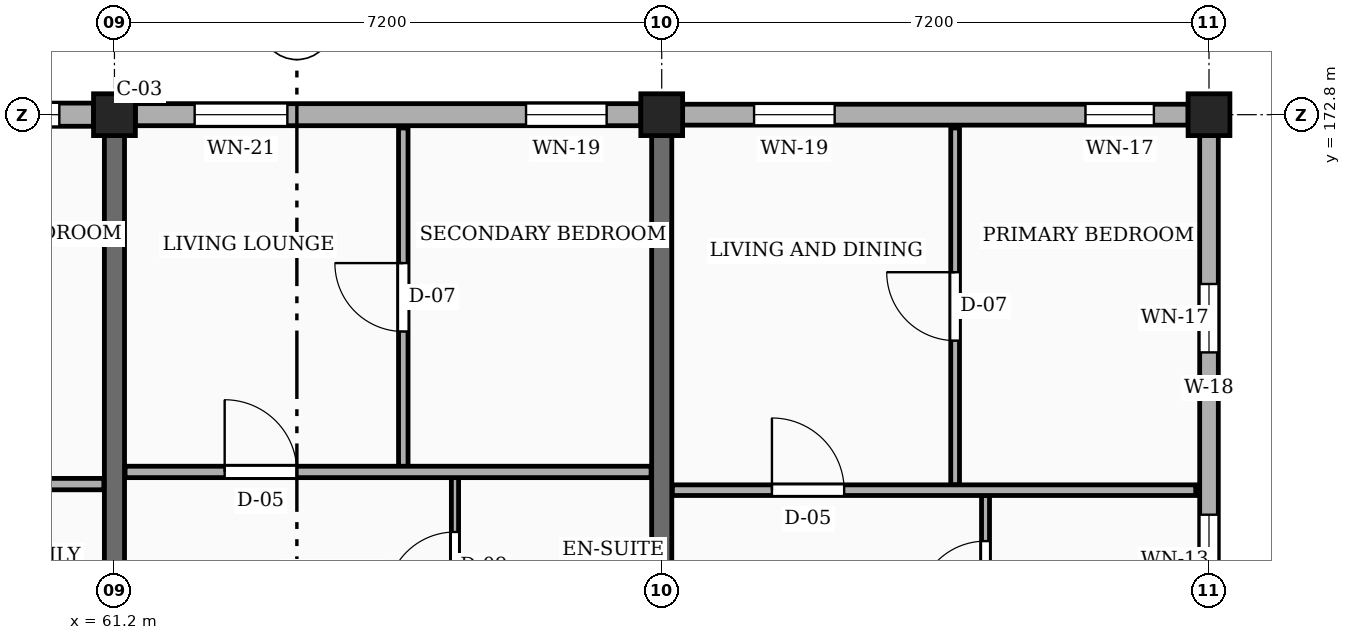
"""IFC4 building model, lengths in metres.
Left out: names, types, materials, properties, quantities, classifications, styles, units other than length and angle.
Written with IfcOpenShell. Run it as: python <this file> out.ifc"""

import sys

from ifc_helpers import new_model, si_unit, direction, frame, frame_2d, origin, origin_2d, place, context, subcontext, project, spatial, rectangle, extrude, element, fill, save


model = new_model("IFC4")
c1 = context("Model", 3, precision=1e-05, world=origin(), true_north=direction((0.0, 1.0)))
c2 = subcontext(c1, "Body", "Model", "MODEL_VIEW")
j1 = project(units=[si_unit("LENGTHUNIT", "METRE"), si_unit("PLANEANGLEUNIT", "RADIAN")], contexts=[c1])
p1 = place(None, origin())
s1 = spatial("IfcSite", under=j1, at=p1, CompositionType="ELEMENT")
p2 = place(p1, origin())
s2 = spatial("IfcBuilding", under=s1, at=p2, CompositionType="ELEMENT")
p3 = place(p2, frame((0.0, 0.0, 10.8)))
s3 = spatial("IfcBuildingStorey", under=s2, at=p3, CompositionType="ELEMENT", Elevation=10.8)
for number, where, z_axis, x_axis in (
    (1, (61.2, 172.8, 0.0), (0.0, 0.0, 1.0), (1.0, 0.0, 0.0)),
    (2, (68.4, 172.8, 0.0), (0.0, 0.0, 1.0), (1.0, 0.0, 0.0)),
    (3, (75.6, 172.8, 0.0), (0.0, 0.0, 1.0), (1.0, 0.0, 0.0)),
):
    element("IfcColumn", number, at=place(p3, frame(where, z_axis=z_axis, x_axis=x_axis)), inside=s3, PredefinedType="COLUMN", context=c2, shape_type="SweptSolid", body=[
        extrude(rectangle(XDim=0.55, YDim=0.55, at=origin_2d()), origin(), (0.0, 0.0, 1.0), 3.15),
    ])
for number, where, z_axis, x_axis in (
    (4, (61.2, 165.925, 0.0), (0.0, 0.0, 1.0), (0.0, 1.0, 0.0)),
    (5, (68.4, 165.925, 0.0), (0.0, 0.0, 1.0), (0.0, 1.0, 0.0)),
):
    element("IfcWall", number, at=place(p3, frame(where, z_axis=z_axis, x_axis=x_axis)), inside=s3, PredefinedType="SOLIDWALL", context=c2, shape_type="SweptSolid", body=[
        extrude(rectangle(XDim=6.6, YDim=0.265, at=frame_2d((3.3, 0.0))), origin(), (0.0, 0.0, 1.0), 2.185),
    ])
p4 = place(p3, frame((75.6, 165.875, 0.0), z_axis=(0.0, 0.0, 1.0), x_axis=(0.0, 1.0, 0.0)))
e6 = element("IfcWall", 6, at=p4, inside=s3, PredefinedType="SOLIDWALL", context=c2, shape_type="SweptSolid", body=[
    extrude(rectangle(XDim=6.65, YDim=0.245, at=frame_2d((3.325, 0.0))), origin(), (0.0, 0.0, 1.0), 2.455),
])
p5 = place(p4, frame((0.462, 0.0, 0.78)))
e7 = element("IfcOpeningElement", 7, at=p5, cuts=e6, PredefinedType="OPENING", context=c2, shape_type="SweptSolid", body=[
    extrude(rectangle(XDim=1.2, YDim=1.26, at=frame_2d((0.6, 0.63))), frame((0.0, 0.133, 0.0), z_axis=(0.0, -1.0, 0.0), x_axis=(1.0, 0.0, 0.0)), (0.0, 0.0, 1.0), 0.265),
])
p6 = place(p4, frame((3.798, 0.0, 0.78)))
e8 = element("IfcOpeningElement", 8, at=p6, cuts=e6, PredefinedType="OPENING", context=c2, shape_type="SweptSolid", body=[
    extrude(rectangle(XDim=0.9, YDim=1.36, at=frame_2d((0.45, 0.68))), frame((0.0, 0.133, 0.0), z_axis=(0.0, -1.0, 0.0), x_axis=(1.0, 0.0, 0.0)), (0.0, 0.0, 1.0), 0.265),
])
p7 = place(p3, frame((75.325, 172.8, 0.0), z_axis=(0.0, 0.0, 1.0), x_axis=(-1.0, 0.0, 0.0)))
e9 = element("IfcWall", 9, at=p7, inside=s3, PredefinedType="SOLIDWALL", context=c2, shape_type="SweptSolid", body=[
    extrude(rectangle(XDim=6.65, YDim=0.275, at=frame_2d((3.325, 0.0))), origin(), (0.0, 0.0, 1.0), 2.455),
])
p8 = place(p7, frame((0.45, 0.0, 0.78)))
e10 = element("IfcOpeningElement", 10, at=p8, cuts=e9, PredefinedType="OPENING", context=c2, shape_type="SweptSolid", body=[
    extrude(rectangle(XDim=0.9, YDim=1.36, at=frame_2d((0.45, 0.68))), frame((0.0, 0.147, 0.0), z_axis=(0.0, -1.0, 0.0), x_axis=(1.0, 0.0, 0.0)), (0.0, 0.0, 1.0), 0.295),
])
p9 = place(p7, frame((4.65, 0.0, 0.78)))
e11 = element("IfcOpeningElement", 11, at=p9, cuts=e9, PredefinedType="OPENING", context=c2, shape_type="SweptSolid", body=[
    extrude(rectangle(XDim=1.06, YDim=1.36, at=frame_2d((0.53, 0.68))), frame((0.0, 0.147, 0.0), z_axis=(0.0, -1.0, 0.0), x_axis=(1.0, 0.0, 0.0)), (0.0, 0.0, 1.0), 0.295),
])
p10 = place(p3, frame((68.125, 172.8, 0.0), z_axis=(0.0, 0.0, 1.0), x_axis=(-1.0, 0.0, 0.0)))
e12 = element("IfcWall", 12, at=p10, inside=s3, PredefinedType="SOLIDWALL", context=c2, shape_type="SweptSolid", body=[
    extrude(rectangle(XDim=6.65, YDim=0.29, at=frame_2d((3.325, 0.0))), origin(), (0.0, 0.0, 1.0), 2.455),
])
p11 = place(p10, frame((0.45, 0.0, 0.78)))
e13 = element("IfcOpeningElement", 13, at=p11, cuts=e12, PredefinedType="OPENING", context=c2, shape_type="SweptSolid", body=[
    extrude(rectangle(XDim=1.06, YDim=1.36, at=frame_2d((0.53, 0.68))), frame((0.0, 0.155, 0.0), z_axis=(0.0, -1.0, 0.0), x_axis=(1.0, 0.0, 0.0)), (0.0, 0.0, 1.0), 0.31),
])
p12 = place(p10, frame((4.65, 0.0, 0.78)))
e14 = element("IfcOpeningElement", 14, at=p12, cuts=e12, PredefinedType="OPENING", context=c2, shape_type="SweptSolid", body=[
    extrude(rectangle(XDim=1.22, YDim=1.36, at=frame_2d((0.61, 0.68))), frame((0.0, 0.155, 0.0), z_axis=(0.0, -1.0, 0.0), x_axis=(1.0, 0.0, 0.0)), (0.0, 0.0, 1.0), 0.31),
])
p13 = place(p3, frame((60.925, 172.8, 0.0), z_axis=(0.0, 0.0, 1.0), x_axis=(-1.0, 0.0, 0.0)))
e15 = element("IfcWall", 15, at=p13, inside=s3, PredefinedType="SOLIDWALL", context=c2, shape_type="SweptSolid", body=[
    extrude(rectangle(XDim=6.65, YDim=0.305, at=frame_2d((3.325, 0.0))), origin(), (0.0, 0.0, 1.0), 2.455),
])
p14 = place(p13, frame((0.45, 0.0, 0.78)))
e16 = element("IfcOpeningElement", 16, at=p14, cuts=e15, PredefinedType="OPENING", context=c2, shape_type="SweptSolid", body=[
    extrude(rectangle(XDim=1.22, YDim=1.36, at=frame_2d((0.61, 0.68))), frame((0.0, 0.163, 0.0), z_axis=(0.0, -1.0, 0.0), x_axis=(1.0, 0.0, 0.0)), (0.0, 0.0, 1.0), 0.325),
])
p15 = place(p13, frame((4.65, 0.0, 0.78)))
e17 = element("IfcOpeningElement", 17, at=p15, cuts=e15, PredefinedType="OPENING", context=c2, shape_type="SweptSolid", body=[
    extrude(rectangle(XDim=1.38, YDim=1.36, at=frame_2d((0.69, 0.68))), frame((0.0, 0.163, 0.0), z_axis=(0.0, -1.0, 0.0), x_axis=(1.0, 0.0, 0.0)), (0.0, 0.0, 1.0), 0.325),
])
p16 = place(p3, frame((54.14, 167.94, 0.0), z_axis=(0.0, 0.0, 1.0), x_axis=(1.0, 0.0, 0.0)))
e18 = element("IfcWall", 18, at=p16, inside=s3, PredefinedType="PARTITIONING", context=c2, shape_type="SweptSolid", body=[
    extrude(rectangle(XDim=6.92, YDim=0.15, at=frame_2d((3.46, 0.0))), origin(), (0.0, 0.0, 1.0), 2.32),
])
p17 = place(p16, frame((1.31, 0.0, 0.0)))
e19 = element("IfcOpeningElement", 19, at=p17, cuts=e18, PredefinedType="OPENING", context=c2, shape_type="SweptSolid", body=[
    extrude(rectangle(XDim=0.92, YDim=2.1, at=frame_2d((0.46, 1.05))), frame((0.0, 0.085, 0.0), z_axis=(0.0, -1.0, 0.0), x_axis=(1.0, 0.0, 0.0)), (0.0, 0.0, 1.0), 0.17),
])
p18 = place(p3, frame((65.0, 168.17, 0.0), z_axis=(0.0, 0.0, 1.0), x_axis=(0.0, 1.0, 0.0)))
e20 = element("IfcWall", 20, at=p18, inside=s3, PredefinedType="PARTITIONING", context=c2, shape_type="SweptSolid", body=[
    extrude(rectangle(XDim=4.455, YDim=0.125, at=frame_2d((2.228, 0.0))), origin(), (0.0, 0.0, 1.0), 2.32),
])
p19 = place(p18, frame((1.778, 0.0, 0.0)))
e21 = element("IfcOpeningElement", 21, at=p19, cuts=e20, PredefinedType="OPENING", context=c2, shape_type="SweptSolid", body=[
    extrude(rectangle(XDim=0.9, YDim=2.1, at=frame_2d((0.45, 1.05))), frame((0.0, 0.073, 0.0), z_axis=(0.0, -1.0, 0.0), x_axis=(1.0, 0.0, 0.0)), (0.0, 0.0, 1.0), 0.145),
])
p20 = place(p3, frame((65.68, 165.69, 0.0), z_axis=(0.0, 0.0, 1.0), x_axis=(0.0, 1.0, 0.0)))
e22 = element("IfcWall", 22, at=p20, inside=s3, PredefinedType="PARTITIONING", context=c2, shape_type="SweptSolid", body=[
    extrude(rectangle(XDim=2.34, YDim=0.095, at=frame_2d((1.17, 0.0))), origin(), (0.0, 0.0, 1.0), 2.32),
])
p21 = place(p20, frame((0.72, 0.0, 0.0)))
e23 = element("IfcOpeningElement", 23, at=p21, cuts=e22, PredefinedType="OPENING", context=c2, shape_type="SweptSolid", body=[
    extrude(rectangle(XDim=0.9, YDim=2.05, at=frame_2d((0.45, 1.025))), frame((0.0, 0.058, 0.0), z_axis=(0.0, -1.0, 0.0), x_axis=(1.0, 0.0, 0.0)), (0.0, 0.0, 1.0), 0.115),
])
p22 = place(p3, frame((61.34, 168.1, 0.0), z_axis=(0.0, 0.0, 1.0), x_axis=(1.0, 0.0, 0.0)))
e24 = element("IfcWall", 24, at=p22, inside=s3, PredefinedType="PARTITIONING", context=c2, shape_type="SweptSolid", body=[
    extrude(rectangle(XDim=6.92, YDim=0.15, at=frame_2d((3.46, 0.0))), origin(), (0.0, 0.0, 1.0), 2.32),
])
p23 = place(p22, frame((1.31, 0.0, 0.0)))
e25 = element("IfcOpeningElement", 25, at=p23, cuts=e24, PredefinedType="OPENING", context=c2, shape_type="SweptSolid", body=[
    extrude(rectangle(XDim=0.95, YDim=2.1, at=frame_2d((0.475, 1.05))), frame((0.0, 0.085, 0.0), z_axis=(0.0, -1.0, 0.0), x_axis=(1.0, 0.0, 0.0)), (0.0, 0.0, 1.0), 0.17),
])
p24 = place(p3, frame((72.26, 167.93, 0.0), z_axis=(0.0, 0.0, 1.0), x_axis=(0.0, 1.0, 0.0)))
e26 = element("IfcWall", 26, at=p24, inside=s3, PredefinedType="PARTITIONING", context=c2, shape_type="SweptSolid", body=[
    extrude(rectangle(XDim=4.695, YDim=0.115, at=frame_2d((2.348, 0.0))), origin(), (0.0, 0.0, 1.0), 2.32),
])
p25 = place(p24, frame((1.897, 0.0, 0.0)))
e27 = element("IfcOpeningElement", 27, at=p25, cuts=e26, PredefinedType="OPENING", context=c2, shape_type="SweptSolid", body=[
    extrude(rectangle(XDim=0.9, YDim=2.1, at=frame_2d((0.45, 1.05))), frame((0.0, 0.067, 0.0), z_axis=(0.0, -1.0, 0.0), x_axis=(1.0, 0.0, 0.0)), (0.0, 0.0, 1.0), 0.135),
])
p26 = place(p3, frame((72.66, 165.69, 0.0), z_axis=(0.0, 0.0, 1.0), x_axis=(0.0, 1.0, 0.0)))
e28 = element("IfcWall", 28, at=p26, inside=s3, PredefinedType="PARTITIONING", context=c2, shape_type="SweptSolid", body=[
    extrude(rectangle(XDim=2.1, YDim=0.105, at=frame_2d((1.05, 0.0))), origin(), (0.0, 0.0, 1.0), 2.32),
])
p27 = place(p26, frame((0.6, 0.0, 0.0)))
e29 = element("IfcOpeningElement", 29, at=p27, cuts=e28, PredefinedType="OPENING", context=c2, shape_type="SweptSolid", body=[
    extrude(rectangle(XDim=0.9, YDim=2.05, at=frame_2d((0.45, 1.025))), frame((0.0, 0.062, 0.0), z_axis=(0.0, -1.0, 0.0), x_axis=(1.0, 0.0, 0.0)), (0.0, 0.0, 1.0), 0.125),
])
p28 = place(p3, frame((68.54, 167.86, 0.0), z_axis=(0.0, 0.0, 1.0), x_axis=(1.0, 0.0, 0.0)))
e30 = element("IfcWall", 30, at=p28, inside=s3, PredefinedType="PARTITIONING", context=c2, shape_type="SweptSolid", body=[
    extrude(rectangle(XDim=6.885, YDim=0.14, at=frame_2d((3.442, 0.0))), origin(), (0.0, 0.0, 1.0), 2.32),
])
p29 = place(p28, frame((1.31, 0.0, 0.0)))
e31 = element("IfcOpeningElement", 31, at=p29, cuts=e30, PredefinedType="OPENING", context=c2, shape_type="SweptSolid", body=[
    extrude(rectangle(XDim=0.95, YDim=2.1, at=frame_2d((0.475, 1.05))), frame((0.0, 0.08, 0.0), z_axis=(0.0, -1.0, 0.0), x_axis=(1.0, 0.0, 0.0)), (0.0, 0.0, 1.0), 0.16),
])
p30 = place(p5, origin())
e32 = element("IfcWindow", 32, at=p30, inside=s3, PartitioningType="SINGLE_PANEL", PredefinedType="WINDOW", context=c2, shape_type="SweptSolid", body=[
    extrude(rectangle(XDim=1.2, YDim=1.26, at=frame_2d((0.6, 0.63))), frame((0.0, 0.03, 0.0), z_axis=(0.0, -1.0, 0.0), x_axis=(1.0, 0.0, 0.0)), (0.0, 0.0, 1.0), 0.06),
])
fill(e7, e32)
p31 = place(p6, origin())
e33 = element("IfcWindow", 33, at=p31, inside=s3, PartitioningType="SINGLE_PANEL", PredefinedType="WINDOW", context=c2, shape_type="SweptSolid", body=[
    extrude(rectangle(XDim=0.9, YDim=1.36, at=frame_2d((0.45, 0.68))), frame((0.0, 0.03, 0.0), z_axis=(0.0, -1.0, 0.0), x_axis=(1.0, 0.0, 0.0)), (0.0, 0.0, 1.0), 0.06),
])
fill(e8, e33)
p32 = place(p8, origin())
e34 = element("IfcWindow", 34, at=p32, inside=s3, PartitioningType="SINGLE_PANEL", PredefinedType="WINDOW", context=c2, shape_type="SweptSolid", body=[
    extrude(rectangle(XDim=0.9, YDim=1.36, at=frame_2d((0.45, 0.68))), frame((0.0, 0.03, 0.0), z_axis=(0.0, -1.0, 0.0), x_axis=(1.0, 0.0, 0.0)), (0.0, 0.0, 1.0), 0.06),
])
fill(e10, e34)
p33 = place(p9, origin())
e35 = element("IfcWindow", 35, at=p33, inside=s3, PartitioningType="SINGLE_PANEL", PredefinedType="WINDOW", context=c2, shape_type="SweptSolid", body=[
    extrude(rectangle(XDim=1.06, YDim=1.36, at=frame_2d((0.53, 0.68))), frame((0.0, 0.03, 0.0), z_axis=(0.0, -1.0, 0.0), x_axis=(1.0, 0.0, 0.0)), (0.0, 0.0, 1.0), 0.06),
])
fill(e11, e35)
p34 = place(p11, origin())
e36 = element("IfcWindow", 36, at=p34, inside=s3, PartitioningType="SINGLE_PANEL", PredefinedType="WINDOW", context=c2, shape_type="SweptSolid", body=[
    extrude(rectangle(XDim=1.06, YDim=1.36, at=frame_2d((0.53, 0.68))), frame((0.0, 0.03, 0.0), z_axis=(0.0, -1.0, 0.0), x_axis=(1.0, 0.0, 0.0)), (0.0, 0.0, 1.0), 0.06),
])
fill(e13, e36)
p35 = place(p12, origin())
e37 = element("IfcWindow", 37, at=p35, inside=s3, PartitioningType="SINGLE_PANEL", PredefinedType="WINDOW", context=c2, shape_type="SweptSolid", body=[
    extrude(rectangle(XDim=1.22, YDim=1.36, at=frame_2d((0.61, 0.68))), frame((0.0, 0.03, 0.0), z_axis=(0.0, -1.0, 0.0), x_axis=(1.0, 0.0, 0.0)), (0.0, 0.0, 1.0), 0.06),
])
fill(e14, e37)
p36 = place(p14, origin())
e38 = element("IfcWindow", 38, at=p36, inside=s3, PartitioningType="SINGLE_PANEL", PredefinedType="WINDOW", context=c2, shape_type="SweptSolid", body=[
    extrude(rectangle(XDim=1.22, YDim=1.36, at=frame_2d((0.61, 0.68))), frame((0.0, 0.03, 0.0), z_axis=(0.0, -1.0, 0.0), x_axis=(1.0, 0.0, 0.0)), (0.0, 0.0, 1.0), 0.06),
])
fill(e16, e38)
p37 = place(p19, origin())
e39 = element("IfcDoor", 39, at=p37, inside=s3, OperationType="SINGLE_SWING_RIGHT", PredefinedType="DOOR", context=c2, shape_type="SweptSolid", body=[
    extrude(rectangle(XDim=0.9, YDim=2.1, at=frame_2d((0.45, 1.05))), frame((0.0, 0.025, 0.0), z_axis=(0.0, -1.0, 0.0), x_axis=(1.0, 0.0, 0.0)), (0.0, 0.0, 1.0), 0.05),
])
fill(e21, e39)
p38 = place(p21, origin())
e40 = element("IfcDoor", 40, at=p38, inside=s3, OperationType="SINGLE_SWING_LEFT", PredefinedType="DOOR", context=c2, shape_type="SweptSolid", body=[
    extrude(rectangle(XDim=0.9, YDim=2.05, at=frame_2d((0.45, 1.025))), frame((0.0, 0.025, 0.0), z_axis=(0.0, -1.0, 0.0), x_axis=(1.0, 0.0, 0.0)), (0.0, 0.0, 1.0), 0.05),
])
fill(e23, e40)
p39 = place(p23, origin())
e41 = element("IfcDoor", 41, at=p39, inside=s3, OperationType="SINGLE_SWING_LEFT", PredefinedType="DOOR", context=c2, shape_type="SweptSolid", body=[
    extrude(rectangle(XDim=0.95, YDim=2.1, at=frame_2d((0.475, 1.05))), frame((0.0, 0.025, 0.0), z_axis=(0.0, -1.0, 0.0), x_axis=(1.0, 0.0, 0.0)), (0.0, 0.0, 1.0), 0.05),
])
fill(e25, e41)
p40 = place(p25, origin())
e42 = element("IfcDoor", 42, at=p40, inside=s3, OperationType="SINGLE_SWING_RIGHT", PredefinedType="DOOR", context=c2, shape_type="SweptSolid", body=[
    extrude(rectangle(XDim=0.9, YDim=2.1, at=frame_2d((0.45, 1.05))), frame((0.0, 0.025, 0.0), z_axis=(0.0, -1.0, 0.0), x_axis=(1.0, 0.0, 0.0)), (0.0, 0.0, 1.0), 0.05),
])
fill(e27, e42)
p41 = place(p27, origin())
e43 = element("IfcDoor", 43, at=p41, inside=s3, OperationType="SINGLE_SWING_LEFT", PredefinedType="DOOR", context=c2, shape_type="SweptSolid", body=[
    extrude(rectangle(XDim=0.9, YDim=2.05, at=frame_2d((0.45, 1.025))), frame((0.0, 0.025, 0.0), z_axis=(0.0, -1.0, 0.0), x_axis=(1.0, 0.0, 0.0)), (0.0, 0.0, 1.0), 0.05),
])
fill(e29, e43)
p42 = place(p29, origin())
e44 = element("IfcDoor", 44, at=p42, inside=s3, OperationType="SINGLE_SWING_LEFT", PredefinedType="DOOR", context=c2, shape_type="SweptSolid", body=[
    extrude(rectangle(XDim=0.95, YDim=2.1, at=frame_2d((0.475, 1.05))), frame((0.0, 0.025, 0.0), z_axis=(0.0, -1.0, 0.0), x_axis=(1.0, 0.0, 0.0)), (0.0, 0.0, 1.0), 0.05),
])
fill(e31, e44)
save(model, sys.argv[1])
